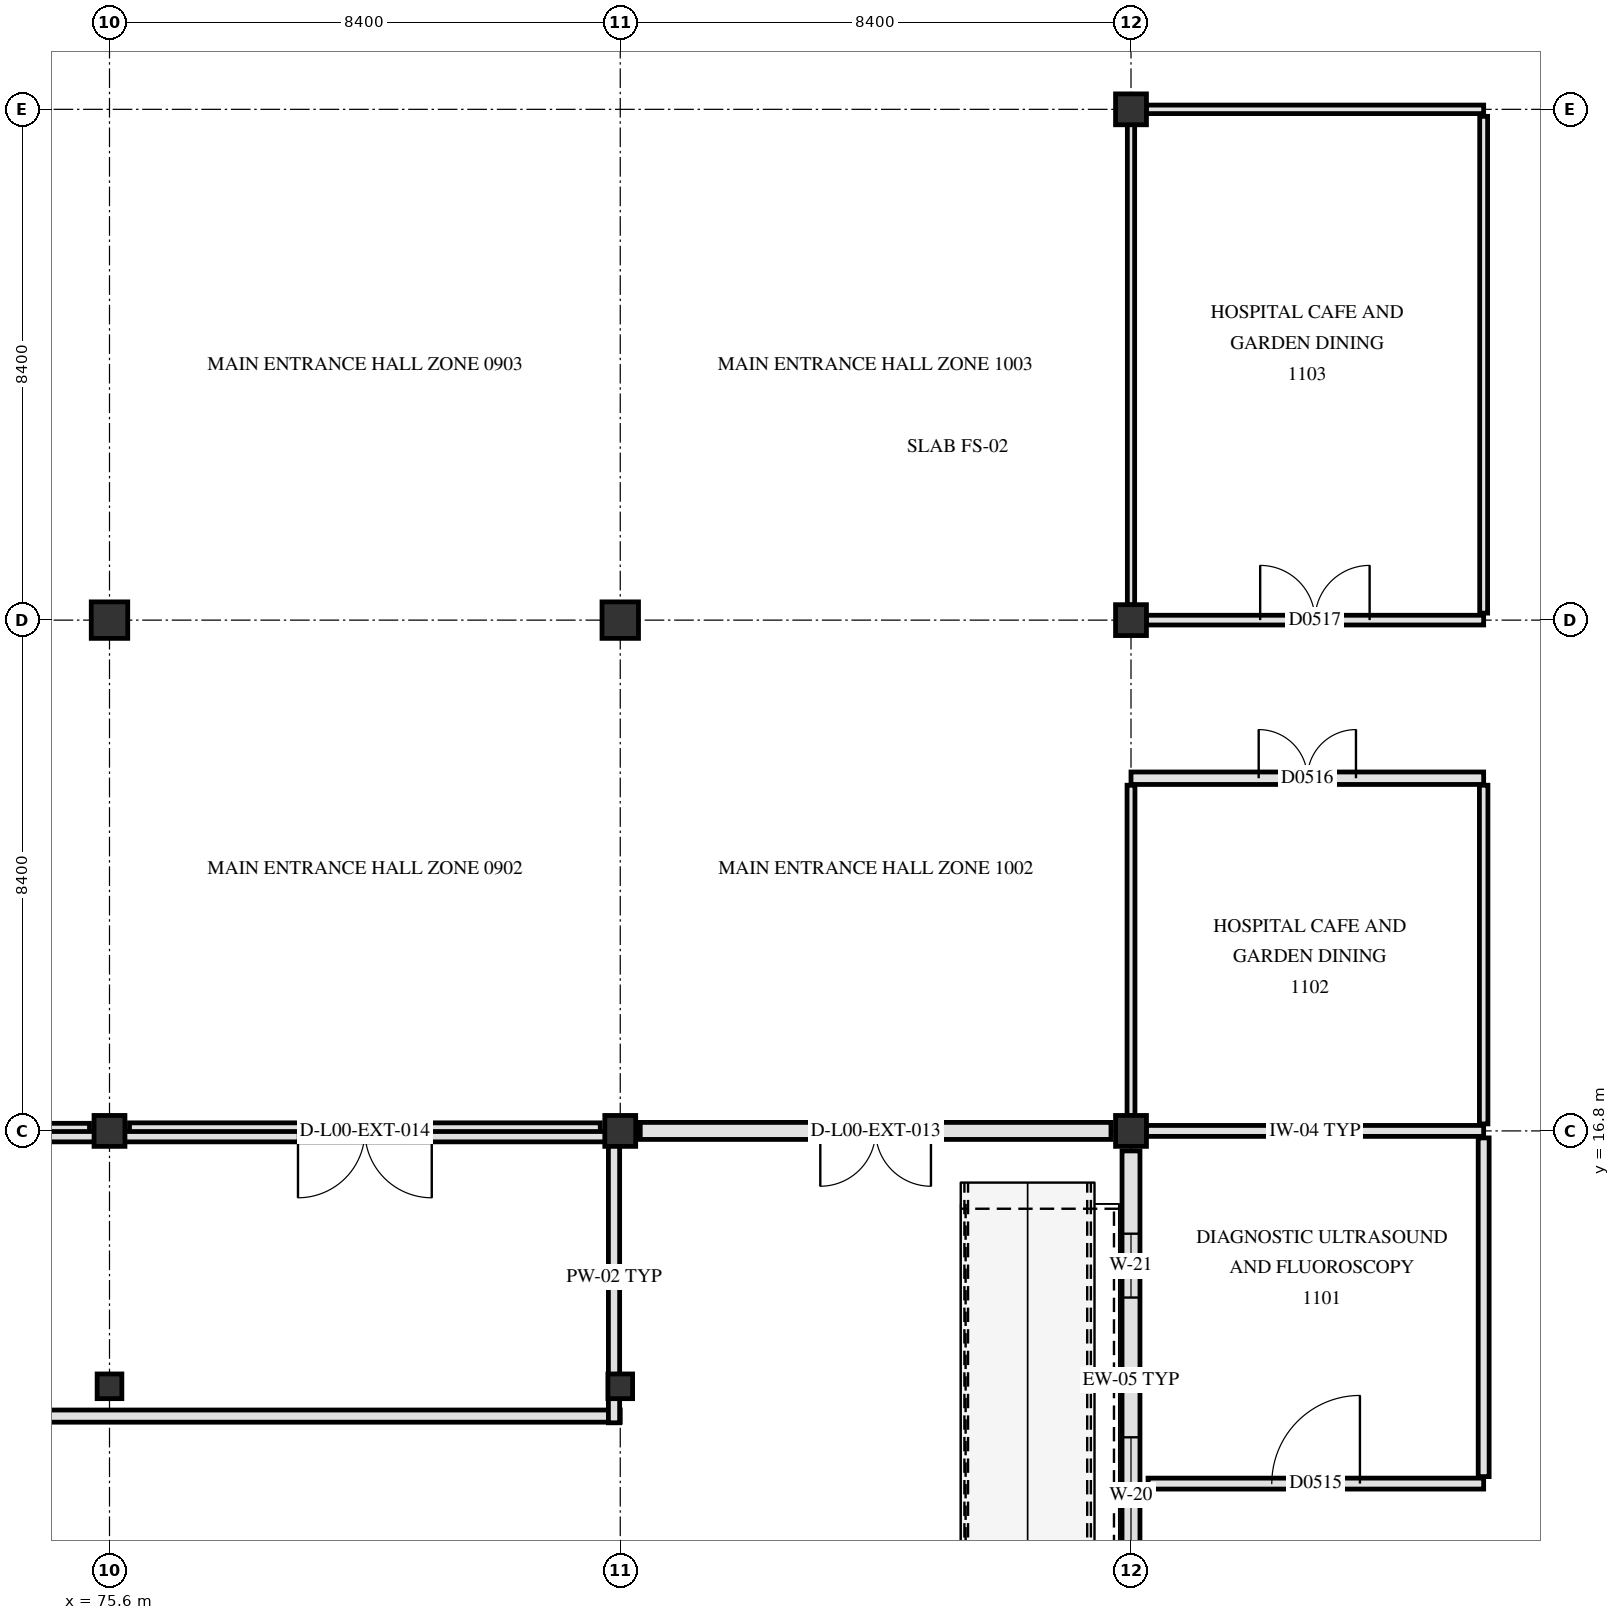
"""IFC4 building model, lengths in metres.
Left out: names, types, materials, properties, quantities, classifications, styles, units other than length and angle.
Written with IfcOpenShell. Run it as: python <this file> out.ifc"""

import sys

from ifc_helpers import new_model, si_unit, direction, frame, frame_2d, origin, origin_2d, place, context, subcontext, project, spatial, rectangle, hollow_circle, extrude, element, fill, save


model = new_model("IFC4")
c1 = context("Model", 3, precision=1e-05, world=origin(), true_north=direction((0.0, 1.0)))
c2 = subcontext(c1, "Body", "Model", "MODEL_VIEW")
j1 = project(units=[si_unit("LENGTHUNIT", "METRE"), si_unit("PLANEANGLEUNIT", "RADIAN")], contexts=[c1])
p1 = place(None, origin())
s1 = spatial("IfcSite", under=j1, at=p1, CompositionType="ELEMENT")
p2 = place(p1, origin())
s2 = spatial("IfcBuilding", under=s1, at=p2, CompositionType="ELEMENT")
p3 = place(p2, origin())
s3 = spatial("IfcBuildingStorey", under=s2, at=p3, CompositionType="ELEMENT", Elevation=0.0)
p4 = place(p3, frame((75.6, 16.8, 0.0), z_axis=(0.0, 0.0, 1.0), x_axis=(1.0, 0.0, 0.0)))
e1 = element("IfcColumn", 1, at=p4, inside=s3, PredefinedType="COLUMN", context=c2, shape_type="SweptSolid", body=[
    extrude(hollow_circle(Radius=0.254, WallThickness=0.02, at=origin_2d()), origin(), (0.0, 0.0, 1.0), 4.8),
])
p5 = place(p3, frame((75.6, 25.2, 0.0), z_axis=(0.0, 0.0, 1.0), x_axis=(1.0, 0.0, 0.0)))
e2 = element("IfcColumn", 2, at=p5, inside=s3, PredefinedType="COLUMN", context=c2, shape_type="SweptSolid", body=[
    extrude(rectangle(XDim=0.6, YDim=0.6, at=origin_2d()), origin(), (0.0, 0.0, 1.0), 4.8),
])
p6 = place(p3, frame((84.0, 16.8, 0.0), z_axis=(0.0, 0.0, 1.0), x_axis=(1.0, 0.0, 0.0)))
e3 = element("IfcColumn", 3, at=p6, inside=s3, PredefinedType="COLUMN", context=c2, shape_type="SweptSolid", body=[
    extrude(hollow_circle(Radius=0.254, WallThickness=0.02, at=origin_2d()), origin(), (0.0, 0.0, 1.0), 4.8),
])
p7 = place(p3, frame((84.0, 25.2, 0.0), z_axis=(0.0, 0.0, 1.0), x_axis=(1.0, 0.0, 0.0)))
e4 = element("IfcColumn", 4, at=p7, inside=s3, PredefinedType="COLUMN", context=c2, shape_type="SweptSolid", body=[
    extrude(rectangle(XDim=0.6, YDim=0.6, at=origin_2d()), origin(), (0.0, 0.0, 1.0), 4.8),
])
for number, where, z_axis, x_axis in (
    (5, (92.4, 16.8, 0.0), (0.0, 0.0, 1.0), (1.0, 0.0, 0.0)),
    (6, (92.4, 25.2, 0.0), (0.0, 0.0, 1.0), (1.0, 0.0, 0.0)),
    (7, (92.4, 33.6, 0.0), (0.0, 0.0, 1.0), (1.0, 0.0, 0.0)),
):
    element("IfcColumn", number, at=place(p3, frame(where, z_axis=z_axis, x_axis=x_axis)), inside=s3, PredefinedType="COLUMN", context=c2, shape_type="SweptSolid", body=[
        extrude(hollow_circle(Radius=0.254, WallThickness=0.02, at=origin_2d()), origin(), (0.0, 0.0, 1.0), 4.8),
    ])
for number, where, z_axis, x_axis in (
    (8, (75.6, 12.6, 0.0), (0.0, 0.0, 1.0), (1.0, 0.0, 0.0)),
    (9, (84.0, 12.6, 0.0), (0.0, 0.0, 1.0), (1.0, 0.0, 0.0)),
):
    element("IfcColumn", number, at=place(p3, frame(where, z_axis=z_axis, x_axis=x_axis)), inside=s3, PredefinedType="COLUMN", context=c2, shape_type="SweptSolid", body=[
        extrude(hollow_circle(Radius=0.203, WallThickness=0.016, at=origin_2d()), origin(), (0.0, 0.0, 1.0), 4.35),
    ])
p8 = place(p3, frame((92.4, 8.925, 0.0), z_axis=(0.0, 0.0, 1.0), x_axis=(0.0, 1.0, 0.0)))
e10 = element("IfcWall", 10, at=p8, inside=s3, PredefinedType="SOLIDWALL", context=c2, shape_type="SweptSolid", body=[
    extrude(rectangle(XDim=7.546, YDim=0.295, at=frame_2d((3.773, 0.0))), origin(), (0.0, 0.0, 1.0), 3.79),
])
p9 = place(p8, frame((0.937, 0.0, 0.85)))
e11 = element("IfcOpeningElement", 11, at=p9, cuts=e10, PredefinedType="OPENING", context=c2, shape_type="SweptSolid", body=[
    extrude(rectangle(XDim=1.9, YDim=1.42, at=frame_2d((0.95, 0.71))), frame((0.0, 0.157, 0.0), z_axis=(0.0, -1.0, 0.0), x_axis=(1.0, 0.0, 0.0)), (0.0, 0.0, 1.0), 0.315),
])
p10 = place(p8, frame((5.135, 0.0, 0.85)))
e12 = element("IfcOpeningElement", 12, at=p10, cuts=e10, PredefinedType="OPENING", context=c2, shape_type="SweptSolid", body=[
    extrude(rectangle(XDim=1.05, YDim=1.54, at=frame_2d((0.525, 0.77))), frame((0.0, 0.157, 0.0), z_axis=(0.0, -1.0, 0.0), x_axis=(1.0, 0.0, 0.0)), (0.0, 0.0, 1.0), 0.315),
])
p11 = place(p3, frame((92.071, 16.8, 0.0), z_axis=(0.0, 0.0, 1.0), x_axis=(-1.0, 0.0, 0.0)))
e13 = element("IfcWall", 13, at=p11, inside=s3, PredefinedType="SOLIDWALL", context=c2, shape_type="SweptSolid", body=[
    extrude(rectangle(XDim=7.742, YDim=0.28, at=frame_2d((3.871, 0.0))), origin(), (0.0, 0.0, 1.0), 2.99),
])
p12 = place(p11, frame((2.961, 0.0, 0.0)))
e14 = element("IfcOpeningElement", 14, at=p12, cuts=e13, PredefinedType="OPENING", context=c2, shape_type="SweptSolid", body=[
    extrude(rectangle(XDim=1.82, YDim=2.28, at=frame_2d((0.91, 1.14))), frame((0.0, 0.15, 0.0), z_axis=(0.0, -1.0, 0.0), x_axis=(1.0, 0.0, 0.0)), (0.0, 0.0, 1.0), 0.3),
])
p13 = place(p3, frame((83.671, 16.8, 0.0), z_axis=(0.0, 0.0, 1.0), x_axis=(-1.0, 0.0, 0.0)))
e15 = element("IfcWall", 15, at=p13, inside=s3, PredefinedType="SOLIDWALL", context=c2, shape_type="SweptSolid", body=[
    extrude(rectangle(XDim=7.742, YDim=0.265, at=frame_2d((3.871, 0.0))), origin(), (0.0, 0.0, 1.0), 3.79),
])
p14 = place(p13, frame((2.771, 0.0, 0.0)))
e16 = element("IfcOpeningElement", 16, at=p14, cuts=e15, PredefinedType="OPENING", context=c2, shape_type="SweptSolid", body=[
    extrude(rectangle(XDim=2.2, YDim=2.35, at=frame_2d((1.1, 1.175))), frame((0.0, 0.142, 0.0), z_axis=(0.0, -1.0, 0.0), x_axis=(1.0, 0.0, 0.0)), (0.0, 0.0, 1.0), 0.285),
])
p15 = place(p3, frame((75.271, 16.8, 0.0), z_axis=(0.0, 0.0, 1.0), x_axis=(-1.0, 0.0, 0.0)))
e17 = element("IfcWall", 17, at=p15, inside=s3, PredefinedType="SOLIDWALL", context=c2, shape_type="SweptSolid", body=[
    extrude(rectangle(XDim=7.742, YDim=0.25, at=frame_2d((3.871, 0.0))), origin(), (0.0, 0.0, 1.0), 2.99),
])
p16 = place(p15, frame((2.961, 0.0, 0.0)))
e18 = element("IfcOpeningElement", 18, at=p16, cuts=e17, PredefinedType="OPENING", context=c2, shape_type="SweptSolid", body=[
    extrude(rectangle(XDim=1.82, YDim=2.28, at=frame_2d((0.91, 1.14))), frame((0.0, 0.135, 0.0), z_axis=(0.0, -1.0, 0.0), x_axis=(1.0, 0.0, 0.0)), (0.0, 0.0, 1.0), 0.27),
])
p17 = place(p3, frame((58.8, 12.11, 4.58), z_axis=(0.0, 0.0, 1.0), x_axis=(1.0, 0.0, 0.0)))
e19 = element("IfcWall", 19, at=p17, inside=s3, PredefinedType="PARAPET", context=c2, shape_type="SweptSolid", body=[
    extrude(rectangle(XDim=25.2, YDim=0.2, at=frame_2d((12.6, 0.0))), origin(), (0.0, 0.0, 1.0), 0.47),
])
p18 = place(p3, frame((83.897, 12.0, 4.58), z_axis=(0.0, 0.0, 1.0), x_axis=(0.0, 1.0, 0.0)))
e20 = element("IfcWall", 20, at=p18, inside=s3, PredefinedType="PARAPET", context=c2, shape_type="SweptSolid", body=[
    extrude(rectangle(XDim=4.8, YDim=0.185, at=frame_2d((2.4, 0.0))), origin(), (0.0, 0.0, 1.0), 0.47),
])
p19 = place(p3, frame((84.0, 16.705, 4.58), z_axis=(0.0, 0.0, 1.0), x_axis=(-1.0, 0.0, 0.0)))
e21 = element("IfcWall", 21, at=p19, inside=s3, PredefinedType="PARAPET", context=c2, shape_type="SweptSolid", body=[
    extrude(rectangle(XDim=25.2, YDim=0.17, at=frame_2d((12.6, 0.0))), origin(), (0.0, 0.0, 1.0), 0.47),
])
p20 = place(p3, frame((92.68, 11.0, 0.0), z_axis=(0.0, 0.0, 1.0), x_axis=(1.0, 0.0, 0.0)))
e22 = element("IfcWall", 22, at=p20, inside=s3, PredefinedType="PARTITIONING", context=c2, shape_type="SweptSolid", body=[
    extrude(rectangle(XDim=5.52, YDim=0.18, at=frame_2d((2.76, 0.0))), origin(), (0.0, 0.0, 1.0), 4.49),
])
p21 = place(p20, frame((2.035, 0.0, 0.0)))
e23 = element("IfcOpeningElement", 23, at=p21, cuts=e22, PredefinedType="OPENING", context=c2, shape_type="SweptSolid", body=[
    extrude(rectangle(XDim=1.45, YDim=2.2, at=frame_2d((0.725, 1.1))), frame((0.0, 0.1, 0.0), z_axis=(0.0, -1.0, 0.0), x_axis=(1.0, 0.0, 0.0)), (0.0, 0.0, 1.0), 0.2),
])
p22 = place(p3, frame((92.649, 16.8, 0.0), z_axis=(0.0, 0.0, 1.0), x_axis=(1.0, 0.0, 0.0)))
e24 = element("IfcWall", 24, at=p22, inside=s3, PredefinedType="PARTITIONING", context=c2, shape_type="SweptSolid", body=[
    extrude(rectangle(XDim=5.551, YDim=0.18, at=frame_2d((2.775, 0.0))), origin(), (0.0, 0.0, 1.0), 4.1),
])
p23 = place(p3, frame((92.4, 22.6, 0.0), z_axis=(0.0, 0.0, 1.0), x_axis=(1.0, 0.0, 0.0)))
e25 = element("IfcWall", 25, at=p23, inside=s3, PredefinedType="PARTITIONING", context=c2, shape_type="SweptSolid", body=[
    extrude(rectangle(XDim=5.8, YDim=0.205, at=frame_2d((2.9, 0.0))), origin(), (0.0, 0.0, 1.0), 3.89),
])
p24 = place(p23, frame((2.1, 0.0, 0.0)))
e26 = element("IfcOpeningElement", 26, at=p24, cuts=e25, PredefinedType="OPENING", context=c2, shape_type="SweptSolid", body=[
    extrude(rectangle(XDim=1.6, YDim=2.25, at=frame_2d((0.8, 1.125))), frame((0.0, 0.113, 0.0), z_axis=(0.0, -1.0, 0.0), x_axis=(1.0, 0.0, 0.0)), (0.0, 0.0, 1.0), 0.225),
])
p25 = place(p3, frame((92.649, 25.2, 0.0), z_axis=(0.0, 0.0, 1.0), x_axis=(1.0, 0.0, 0.0)))
e27 = element("IfcWall", 27, at=p25, inside=s3, PredefinedType="PARTITIONING", context=c2, shape_type="SweptSolid", body=[
    extrude(rectangle(XDim=5.551, YDim=0.16, at=frame_2d((2.775, 0.0))), origin(), (0.0, 0.0, 1.0), 3.84),
])
p26 = place(p25, frame((1.875, 0.0, 0.0)))
e28 = element("IfcOpeningElement", 28, at=p26, cuts=e27, PredefinedType="OPENING", context=c2, shape_type="SweptSolid", body=[
    extrude(rectangle(XDim=1.8, YDim=2.25, at=frame_2d((0.9, 1.125))), frame((0.0, 0.09, 0.0), z_axis=(0.0, -1.0, 0.0), x_axis=(1.0, 0.0, 0.0)), (0.0, 0.0, 1.0), 0.18),
])
p27 = place(p3, frame((92.649, 33.6, 0.0), z_axis=(0.0, 0.0, 1.0), x_axis=(1.0, 0.0, 0.0)))
e29 = element("IfcWall", 29, at=p27, inside=s3, PredefinedType="PARTITIONING", context=c2, shape_type="SweptSolid", body=[
    extrude(rectangle(XDim=5.551, YDim=0.14, at=frame_2d((2.775, 0.0))), origin(), (0.0, 0.0, 1.0), 3.84),
])
p28 = place(p3, frame((92.4, 17.049, 0.0), z_axis=(0.0, 0.0, 1.0), x_axis=(0.0, 1.0, 0.0)))
e30 = element("IfcWall", 30, at=p28, inside=s3, PredefinedType="PARTITIONING", context=c2, shape_type="SweptSolid", body=[
    extrude(rectangle(XDim=5.436, YDim=0.13, at=frame_2d((2.718, 0.0))), origin(), (0.0, 0.0, 1.0), 3.89),
])
p29 = place(p3, frame((92.4, 25.449, 0.0), z_axis=(0.0, 0.0, 1.0), x_axis=(0.0, 1.0, 0.0)))
e31 = element("IfcWall", 31, at=p29, inside=s3, PredefinedType="PARTITIONING", context=c2, shape_type="SweptSolid", body=[
    extrude(rectangle(XDim=7.902, YDim=0.12, at=frame_2d((3.951, 0.0))), origin(), (0.0, 0.0, 1.0), 3.89),
])
p30 = place(p3, frame((98.2, 11.115, 0.0), z_axis=(0.0, 0.0, 1.0), x_axis=(0.0, 1.0, 0.0)))
e32 = element("IfcWall", 32, at=p30, inside=s3, PredefinedType="PARTITIONING", context=c2, shape_type="SweptSolid", body=[
    extrude(rectangle(XDim=5.57, YDim=0.18, at=frame_2d((2.785, 0.0))), origin(), (0.0, 0.0, 1.0), 4.1),
])
p31 = place(p3, frame((98.2, 16.915, 0.0), z_axis=(0.0, 0.0, 1.0), x_axis=(0.0, 1.0, 0.0)))
e33 = element("IfcWall", 33, at=p31, inside=s3, PredefinedType="PARTITIONING", context=c2, shape_type="SweptSolid", body=[
    extrude(rectangle(XDim=5.57, YDim=0.14, at=frame_2d((2.785, 0.0))), origin(), (0.0, 0.0, 1.0), 4.1),
])
p32 = place(p3, frame((98.2, 25.315, 0.0), z_axis=(0.0, 0.0, 1.0), x_axis=(0.0, 1.0, 0.0)))
e34 = element("IfcWall", 34, at=p32, inside=s3, PredefinedType="PARTITIONING", context=c2, shape_type="SweptSolid", body=[
    extrude(rectangle(XDim=8.17, YDim=0.13, at=frame_2d((4.085, 0.0))), origin(), (0.0, 0.0, 1.0), 3.84),
])
p33 = place(p9, origin())
e35 = element("IfcWindow", 35, at=p33, inside=s3, PartitioningType="SINGLE_PANEL", PredefinedType="WINDOW", context=c2, shape_type="SweptSolid", body=[
    extrude(rectangle(XDim=1.9, YDim=1.42, at=frame_2d((0.95, 0.71))), frame((0.0, 0.03, 0.0), z_axis=(0.0, -1.0, 0.0), x_axis=(1.0, 0.0, 0.0)), (0.0, 0.0, 1.0), 0.06),
])
fill(e11, e35)
p34 = place(p10, origin())
e36 = element("IfcWindow", 36, at=p34, inside=s3, PartitioningType="SINGLE_PANEL", PredefinedType="WINDOW", context=c2, shape_type="SweptSolid", body=[
    extrude(rectangle(XDim=1.05, YDim=1.54, at=frame_2d((0.525, 0.77))), frame((0.0, 0.03, 0.0), z_axis=(0.0, -1.0, 0.0), x_axis=(1.0, 0.0, 0.0)), (0.0, 0.0, 1.0), 0.06),
])
fill(e12, e36)
p35 = place(p12, origin())
e37 = element("IfcDoor", 37, at=p35, inside=s3, OperationType="DOUBLE_SWING_LEFT", PredefinedType="DOOR", context=c2, shape_type="SweptSolid", body=[
    extrude(rectangle(XDim=1.82, YDim=2.28, at=frame_2d((0.91, 1.14))), frame((0.0, 0.025, 0.0), z_axis=(0.0, -1.0, 0.0), x_axis=(1.0, 0.0, 0.0)), (0.0, 0.0, 1.0), 0.05),
])
fill(e14, e37)
p36 = place(p14, origin())
e38 = element("IfcDoor", 38, at=p36, inside=s3, OperationType="DOUBLE_SWING_LEFT", PredefinedType="DOOR", context=c2, shape_type="SweptSolid", body=[
    extrude(rectangle(XDim=2.2, YDim=2.35, at=frame_2d((1.1, 1.175))), frame((0.0, 0.025, 0.0), z_axis=(0.0, -1.0, 0.0), x_axis=(1.0, 0.0, 0.0)), (0.0, 0.0, 1.0), 0.05),
])
fill(e16, e38)
p37 = place(p21, origin())
e39 = element("IfcDoor", 39, at=p37, inside=s3, OperationType="SINGLE_SWING_RIGHT", PredefinedType="DOOR", context=c2, shape_type="SweptSolid", body=[
    extrude(rectangle(XDim=1.45, YDim=2.2, at=frame_2d((0.725, 1.1))), frame((0.0, 0.025, 0.0), z_axis=(0.0, -1.0, 0.0), x_axis=(1.0, 0.0, 0.0)), (0.0, 0.0, 1.0), 0.05),
])
fill(e23, e39)
p38 = place(p24, origin())
e40 = element("IfcDoor", 40, at=p38, inside=s3, OperationType="DOUBLE_SWING_LEFT", PredefinedType="DOOR", context=c2, shape_type="SweptSolid", body=[
    extrude(rectangle(XDim=1.6, YDim=2.25, at=frame_2d((0.8, 1.125))), frame((0.0, 0.025, 0.0), z_axis=(0.0, -1.0, 0.0), x_axis=(1.0, 0.0, 0.0)), (0.0, 0.0, 1.0), 0.05),
])
fill(e26, e40)
p39 = place(p26, origin())
e41 = element("IfcDoor", 41, at=p39, inside=s3, OperationType="DOUBLE_SWING_RIGHT", PredefinedType="DOOR", context=c2, shape_type="SweptSolid", body=[
    extrude(rectangle(XDim=1.8, YDim=2.25, at=frame_2d((0.9, 1.125))), frame((0.0, 0.025, 0.0), z_axis=(0.0, -1.0, 0.0), x_axis=(1.0, 0.0, 0.0)), (0.0, 0.0, 1.0), 0.05),
])
fill(e28, e41)
save(model, sys.argv[1])
